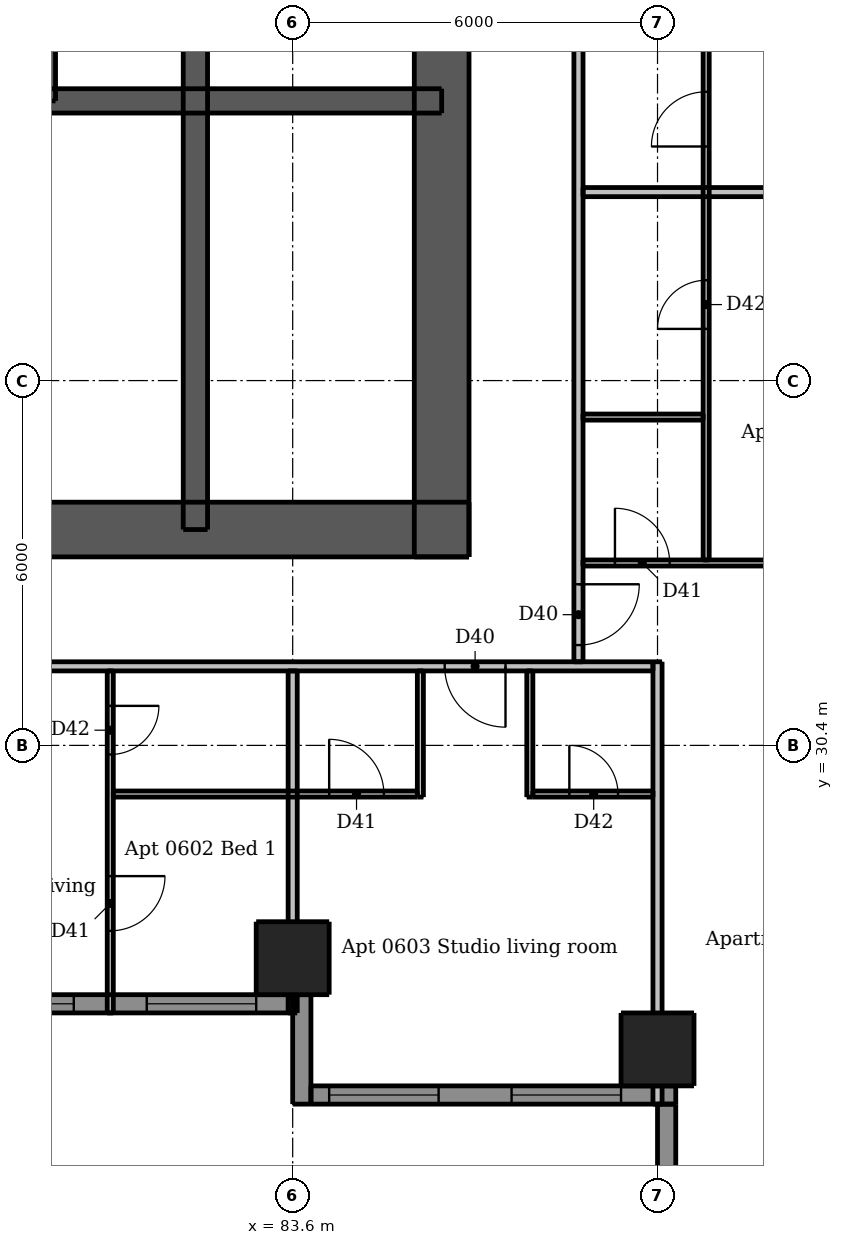
"""IFC4 building model, lengths in metres.
Left out: names, types, materials, properties, quantities, classifications, styles, units other than length and angle.
Written with IfcOpenShell. Run it as: python <this file> out.ifc"""

import sys

from ifc_helpers import new_model, si_unit, direction, frame, frame_2d, origin, origin_2d, place, context, subcontext, project, spatial, rectangle, extrude, element, fill, save


model = new_model("IFC4")
c1 = context("Model", 3, precision=1e-05, world=origin(), true_north=direction((0.0, 1.0)))
c2 = subcontext(c1, "Body", "Model", "MODEL_VIEW")
j1 = project(units=[si_unit("LENGTHUNIT", "METRE"), si_unit("PLANEANGLEUNIT", "RADIAN")], contexts=[c1])
p1 = place(None, origin())
s1 = spatial("IfcSite", under=j1, at=p1, CompositionType="ELEMENT")
p2 = place(p1, origin())
s2 = spatial("IfcBuilding", under=s1, at=p2, CompositionType="ELEMENT")
p3 = place(p2, frame((0.0, 0.0, 26.8)))
s3 = spatial("IfcBuildingStorey", under=s2, at=p3, CompositionType="ELEMENT", Elevation=26.8)
p4 = place(p3, frame((62.5, 33.95, 0.0), z_axis=(0.0, 0.0, 1.0), x_axis=(1.0, 0.0, 0.0)))
e1 = element("IfcWall", 1, at=p4, inside=s3, PredefinedType="SHEAR", context=c2, shape_type="SweptSolid", body=[
    extrude(rectangle(XDim=24.0, YDim=0.9, at=frame_2d((12.0, 0.0))), origin(), (0.0, 0.0, 1.0), 3.05),
])
p5 = place(p4, frame((2.05, 0.0, 0.0)))
e2 = element("IfcOpeningElement", 2, at=p5, cuts=e1, PredefinedType="OPENING", context=c2, shape_type="SweptSolid", body=[
    extrude(rectangle(XDim=1.1, YDim=2.1, at=frame_2d((0.55, 1.05))), frame((0.0, 0.46, 0.0), z_axis=(0.0, -1.0, 0.0), x_axis=(1.0, 0.0, 0.0)), (0.0, 0.0, 1.0), 0.92),
])
p6 = place(p4, frame((20.85, 0.0, 0.0)))
e3 = element("IfcOpeningElement", 3, at=p6, cuts=e1, PredefinedType="OPENING", context=c2, shape_type="SweptSolid", body=[
    extrude(rectangle(XDim=1.1, YDim=2.1, at=frame_2d((0.55, 1.05))), frame((0.0, 0.46, 0.0), z_axis=(0.0, -1.0, 0.0), x_axis=(1.0, 0.0, 0.0)), (0.0, 0.0, 1.0), 0.92),
])
p7 = place(p4, frame((8.0, 0.0, 0.0)))
e4 = element("IfcOpeningElement", 4, at=p7, cuts=e1, PredefinedType="OPENING", context=c2, shape_type="SweptSolid", body=[
    extrude(rectangle(XDim=1.1, YDim=2.1, at=frame_2d((0.55, 1.05))), frame((0.0, 0.46, 0.0), z_axis=(0.0, -1.0, 0.0), x_axis=(1.0, 0.0, 0.0)), (0.0, 0.0, 1.0), 0.92),
])
p8 = place(p4, frame((15.3, 0.0, 0.0)))
e5 = element("IfcOpeningElement", 5, at=p8, cuts=e1, PredefinedType="OPENING", context=c2, shape_type="SweptSolid", body=[
    extrude(rectangle(XDim=0.9, YDim=2.1, at=frame_2d((0.45, 1.05))), frame((0.0, 0.46, 0.0), z_axis=(0.0, -1.0, 0.0), x_axis=(1.0, 0.0, 0.0)), (0.0, 0.0, 1.0), 0.92),
])
p9 = place(p3, frame((86.05, 33.5, 0.0), z_axis=(0.0, 0.0, 1.0), x_axis=(0.0, 1.0, 0.0)))
e6 = element("IfcWall", 6, at=p9, inside=s3, PredefinedType="SHEAR", context=c2, shape_type="SweptSolid", body=[
    extrude(rectangle(XDim=24.0, YDim=0.9, at=frame_2d((12.0, 0.0))), origin(), (0.0, 0.0, 1.0), 3.05),
])
p10 = place(p9, frame((11.2, 0.0, 0.0)))
e7 = element("IfcOpeningElement", 7, at=p10, cuts=e6, PredefinedType="OPENING", context=c2, shape_type="SweptSolid", body=[
    extrude(rectangle(XDim=1.6, YDim=2.1, at=frame_2d((0.8, 1.05))), frame((0.0, 0.46, 0.0), z_axis=(0.0, -1.0, 0.0), x_axis=(1.0, 0.0, 0.0)), (0.0, 0.0, 1.0), 0.92),
])
p11 = place(p3, frame((62.95, 41.0, 0.0), z_axis=(0.0, 0.0, 1.0), x_axis=(1.0, 0.0, 0.0)))
e8 = element("IfcWall", 8, at=p11, inside=s3, PredefinedType="SHEAR", context=c2, shape_type="SweptSolid", body=[
    extrude(rectangle(XDim=23.1, YDim=0.4, at=frame_2d((11.55, 0.0))), origin(), (0.0, 0.0, 1.0), 3.05),
])
p12 = place(p3, frame((82.0, 33.95, 0.0), z_axis=(0.0, 0.0, 1.0), x_axis=(0.0, 1.0, 0.0)))
e9 = element("IfcWall", 9, at=p12, inside=s3, PredefinedType="SHEAR", context=c2, shape_type="SweptSolid", body=[
    extrude(rectangle(XDim=9.95, YDim=0.4, at=frame_2d((4.975, 0.0))), origin(), (0.0, 0.0, 1.0), 3.05),
])
p13 = place(p3, frame((79.5, 41.0, 0.0), z_axis=(0.0, 0.0, 1.0), x_axis=(0.0, 1.0, 0.0)))
e10 = element("IfcWall", 10, at=p13, inside=s3, PredefinedType="SHEAR", context=c2, shape_type="SweptSolid", body=[
    extrude(rectangle(XDim=2.9, YDim=0.4, at=frame_2d((1.45, 0.0))), origin(), (0.0, 0.0, 1.0), 3.05),
])
for number, where, z_axis, x_axis in (
    (11, (83.6, 26.9, 0.0), (0.0, 0.0, 1.0), (1.0, 0.0, 0.0)),
    (12, (89.6, 25.4, 0.0), (0.0, 0.0, 1.0), (1.0, 0.0, 0.0)),
):
    element("IfcColumn", number, at=place(p3, frame(where, z_axis=z_axis, x_axis=x_axis)), inside=s3, PredefinedType="COLUMN", context=c2, shape_type="SweptSolid", body=[
        extrude(rectangle(XDim=1.2, YDim=1.2, at=origin_2d()), origin(), (0.0, 0.0, 1.0), 3.05),
    ])
p14 = place(p3, frame((83.75, 26.3, 0.0), z_axis=(0.0, 0.0, 1.0), x_axis=(0.0, -1.0, 0.0)))
e13 = element("IfcWall", 13, at=p14, inside=s3, PredefinedType="SOLIDWALL", context=c2, shape_type="SweptSolid", body=[
    extrude(rectangle(XDim=1.8, YDim=0.3, at=frame_2d((0.9, 0.0))), origin(), (0.0, 0.0, 1.0), 3.05),
])
p15 = place(p3, frame((89.75, 24.5, 0.0), z_axis=(0.0, 0.0, 1.0), x_axis=(0.0, -1.0, 0.0)))
e14 = element("IfcWall", 14, at=p15, inside=s3, PredefinedType="SOLIDWALL", context=c2, shape_type="SweptSolid", body=[
    extrude(rectangle(XDim=4.5, YDim=0.3, at=frame_2d((2.25, 0.0))), origin(), (0.0, 0.0, 1.0), 3.05),
])
p16 = place(p15, frame((1.05, 0.0, 0.15)))
e15 = element("IfcOpeningElement", 15, at=p16, cuts=e14, PredefinedType="OPENING", context=c2, shape_type="SweptSolid", body=[
    extrude(rectangle(XDim=2.4, YDim=2.1, at=frame_2d((1.2, 1.05))), frame((0.0, 0.16, 0.0), z_axis=(0.0, -1.0, 0.0), x_axis=(1.0, 0.0, 0.0)), (0.0, 0.0, 1.0), 0.32),
])
p17 = place(p3, frame((77.6, 26.15, 0.0), z_axis=(0.0, 0.0, 1.0), x_axis=(1.0, 0.0, 0.0)))
e16 = element("IfcWall", 16, at=p17, inside=s3, PredefinedType="SOLIDWALL", context=c2, shape_type="SweptSolid", body=[
    extrude(rectangle(XDim=6.0, YDim=0.3, at=frame_2d((3.0, 0.0))), origin(), (0.0, 0.0, 1.0), 3.05),
])
p18 = place(p17, frame((0.6, 0.0, 0.15)))
e17 = element("IfcOpeningElement", 17, at=p18, cuts=e16, PredefinedType="OPENING", context=c2, shape_type="SweptSolid", body=[
    extrude(rectangle(XDim=1.8, YDim=2.1, at=frame_2d((0.9, 1.05))), frame((0.0, 0.16, 0.0), z_axis=(0.0, -1.0, 0.0), x_axis=(1.0, 0.0, 0.0)), (0.0, 0.0, 1.0), 0.32),
])
p19 = place(p17, frame((3.6, 0.0, 0.15)))
e18 = element("IfcOpeningElement", 18, at=p19, cuts=e16, PredefinedType="OPENING", context=c2, shape_type="SweptSolid", body=[
    extrude(rectangle(XDim=1.8, YDim=2.1, at=frame_2d((0.9, 1.05))), frame((0.0, 0.16, 0.0), z_axis=(0.0, -1.0, 0.0), x_axis=(1.0, 0.0, 0.0)), (0.0, 0.0, 1.0), 0.32),
])
p20 = place(p3, frame((83.9, 24.65, 0.0), z_axis=(0.0, 0.0, 1.0), x_axis=(1.0, 0.0, 0.0)))
e19 = element("IfcWall", 19, at=p20, inside=s3, PredefinedType="SOLIDWALL", context=c2, shape_type="SweptSolid", body=[
    extrude(rectangle(XDim=6.0, YDim=0.3, at=frame_2d((3.0, 0.0))), origin(), (0.0, 0.0, 1.0), 3.05),
])
p21 = place(p20, frame((0.3, 0.0, 0.15)))
e20 = element("IfcOpeningElement", 20, at=p21, cuts=e19, PredefinedType="OPENING", context=c2, shape_type="SweptSolid", body=[
    extrude(rectangle(XDim=1.8, YDim=2.1, at=frame_2d((0.9, 1.05))), frame((0.0, 0.16, 0.0), z_axis=(0.0, -1.0, 0.0), x_axis=(1.0, 0.0, 0.0)), (0.0, 0.0, 1.0), 0.32),
])
p22 = place(p20, frame((3.3, 0.0, 0.15)))
e21 = element("IfcOpeningElement", 21, at=p22, cuts=e19, PredefinedType="OPENING", context=c2, shape_type="SweptSolid", body=[
    extrude(rectangle(XDim=1.8, YDim=2.1, at=frame_2d((0.9, 1.05))), frame((0.0, 0.16, 0.0), z_axis=(0.0, -1.0, 0.0), x_axis=(1.0, 0.0, 0.0)), (0.0, 0.0, 1.0), 0.32),
])
p23 = place(p3, frame((80.6, 31.625, 0.0), z_axis=(0.0, 0.0, 1.0), x_axis=(0.0, -1.0, 0.0)))
e22 = element("IfcWall", 22, at=p23, inside=s3, PredefinedType="PARTITIONING", context=c2, shape_type="SweptSolid", body=[
    extrude(rectangle(XDim=5.625, YDim=0.1, at=frame_2d((2.812, 0.0))), origin(), (0.0, 0.0, 1.0), 3.05),
])
p24 = place(p23, frame((3.375, 0.0, 0.0)))
e23 = element("IfcOpeningElement", 23, at=p24, cuts=e22, PredefinedType="OPENING", context=c2, shape_type="SweptSolid", body=[
    extrude(rectangle(XDim=0.9, YDim=2.1, at=frame_2d((0.45, 1.05))), frame((0.0, 0.06, 0.0), z_axis=(0.0, -1.0, 0.0), x_axis=(1.0, 0.0, 0.0)), (0.0, 0.0, 1.0), 0.12),
])
p25 = place(p23, frame((0.575, 0.0, 0.0)))
e24 = element("IfcOpeningElement", 24, at=p25, cuts=e22, PredefinedType="OPENING", context=c2, shape_type="SweptSolid", body=[
    extrude(rectangle(XDim=0.8, YDim=2.1, at=frame_2d((0.4, 1.05))), frame((0.0, 0.06, 0.0), z_axis=(0.0, -1.0, 0.0), x_axis=(1.0, 0.0, 0.0)), (0.0, 0.0, 1.0), 0.12),
])
for number, where, z_axis, x_axis in (
    (25, (85.7, 29.55, 0.0), (0.0, 0.0, 1.0), (0.0, 1.0, 0.0)),
    (26, (87.5, 29.55, 0.0), (0.0, 0.0, 1.0), (0.0, 1.0, 0.0)),
):
    element("IfcWall", number, at=place(p3, frame(where, z_axis=z_axis, x_axis=x_axis)), inside=s3, PredefinedType="PARTITIONING", context=c2, shape_type="SweptSolid", body=[
        extrude(rectangle(XDim=2.075, YDim=0.1, at=frame_2d((1.038, 0.0))), origin(), (0.0, 0.0, 1.0), 3.05),
    ])
p26 = place(p3, frame((90.4, 33.45, 0.0), z_axis=(0.0, 0.0, 1.0), x_axis=(0.0, 1.0, 0.0)))
e27 = element("IfcWall", 27, at=p26, inside=s3, PredefinedType="PARTITIONING", context=c2, shape_type="SweptSolid", body=[
    extrude(rectangle(XDim=8.5, YDim=0.1, at=frame_2d((4.25, 0.0))), origin(), (0.0, 0.0, 1.0), 3.05),
])
p27 = place(p26, frame((3.8, 0.0, 0.0)))
e28 = element("IfcOpeningElement", 28, at=p27, cuts=e27, PredefinedType="OPENING", context=c2, shape_type="SweptSolid", body=[
    extrude(rectangle(XDim=0.8, YDim=2.1, at=frame_2d((0.4, 1.05))), frame((0.0, 0.06, 0.0), z_axis=(0.0, -1.0, 0.0), x_axis=(1.0, 0.0, 0.0)), (0.0, 0.0, 1.0), 0.12),
])
p28 = place(p26, frame((6.8, 0.0, 0.0)))
e29 = element("IfcOpeningElement", 29, at=p28, cuts=e27, PredefinedType="OPENING", context=c2, shape_type="SweptSolid", body=[
    extrude(rectangle(XDim=0.9, YDim=2.1, at=frame_2d((0.45, 1.05))), frame((0.0, 0.06, 0.0), z_axis=(0.0, -1.0, 0.0), x_axis=(1.0, 0.0, 0.0)), (0.0, 0.0, 1.0), 0.12),
])
p29 = place(p3, frame((88.375, 35.8, 0.0), z_axis=(0.0, 0.0, 1.0), x_axis=(1.0, 0.0, 0.0)))
e30 = element("IfcWall", 30, at=p29, inside=s3, PredefinedType="PARTITIONING", context=c2, shape_type="SweptSolid", body=[
    extrude(rectangle(XDim=1.975, YDim=0.1, at=frame_2d((0.988, 0.0))), origin(), (0.0, 0.0, 1.0), 3.05),
])
p30 = place(p3, frame((88.375, 33.4, 0.0), z_axis=(0.0, 0.0, 1.0), x_axis=(1.0, 0.0, 0.0)))
e31 = element("IfcWall", 31, at=p30, inside=s3, PredefinedType="PARTITIONING", context=c2, shape_type="SweptSolid", body=[
    extrude(rectangle(XDim=5.625, YDim=0.1, at=frame_2d((2.812, 0.0))), origin(), (0.0, 0.0, 1.0), 3.05),
])
p31 = place(p30, frame((0.525, 0.0, 0.0)))
e32 = element("IfcOpeningElement", 32, at=p31, cuts=e31, PredefinedType="OPENING", context=c2, shape_type="SweptSolid", body=[
    extrude(rectangle(XDim=0.9, YDim=2.1, at=frame_2d((0.45, 1.05))), frame((0.0, 0.06, 0.0), z_axis=(0.0, -1.0, 0.0), x_axis=(1.0, 0.0, 0.0)), (0.0, 0.0, 1.0), 0.12),
])
p32 = place(p30, frame((3.375, 0.0, 0.0)))
e33 = element("IfcOpeningElement", 33, at=p32, cuts=e31, PredefinedType="OPENING", context=c2, shape_type="SweptSolid", body=[
    extrude(rectangle(XDim=0.9, YDim=2.1, at=frame_2d((0.45, 1.05))), frame((0.0, 0.06, 0.0), z_axis=(0.0, -1.0, 0.0), x_axis=(1.0, 0.0, 0.0)), (0.0, 0.0, 1.0), 0.12),
])
p33 = place(p3, frame((80.65, 29.6, 0.0), z_axis=(0.0, 0.0, 1.0), x_axis=(1.0, 0.0, 0.0)))
e34 = element("IfcWall", 34, at=p33, inside=s3, PredefinedType="PARTITIONING", context=c2, shape_type="SweptSolid", body=[
    extrude(rectangle(XDim=5.0, YDim=0.1, at=frame_2d((2.5, 0.0))), origin(), (0.0, 0.0, 1.0), 3.05),
])
p34 = place(p33, frame((3.55, 0.0, 0.0)))
e35 = element("IfcOpeningElement", 35, at=p34, cuts=e34, PredefinedType="OPENING", context=c2, shape_type="SweptSolid", body=[
    extrude(rectangle(XDim=0.9, YDim=2.1, at=frame_2d((0.45, 1.05))), frame((0.0, 0.06, 0.0), z_axis=(0.0, -1.0, 0.0), x_axis=(1.0, 0.0, 0.0)), (0.0, 0.0, 1.0), 0.12),
])
p35 = place(p3, frame((87.55, 29.6, 0.0), z_axis=(0.0, 0.0, 1.0), x_axis=(1.0, 0.0, 0.0)))
e36 = element("IfcWall", 36, at=p35, inside=s3, PredefinedType="PARTITIONING", context=c2, shape_type="SweptSolid", body=[
    extrude(rectangle(XDim=1.975, YDim=0.1, at=frame_2d((0.987, 0.0))), origin(), (0.0, 0.0, 1.0), 3.05),
])
p36 = place(p35, frame((0.6, 0.0, 0.0)))
e37 = element("IfcOpeningElement", 37, at=p36, cuts=e36, PredefinedType="OPENING", context=c2, shape_type="SweptSolid", body=[
    extrude(rectangle(XDim=0.8, YDim=2.1, at=frame_2d((0.4, 1.05))), frame((0.0, 0.06, 0.0), z_axis=(0.0, -1.0, 0.0), x_axis=(1.0, 0.0, 0.0)), (0.0, 0.0, 1.0), 0.12),
])
p37 = place(p3, frame((83.6, 26.0, 0.0), z_axis=(0.0, 0.0, 1.0), x_axis=(0.0, 1.0, 0.0)))
e38 = element("IfcWall", 38, at=p37, inside=s3, PredefinedType="PARTITIONING", context=c2, shape_type="SweptSolid", body=[
    extrude(rectangle(XDim=5.625, YDim=0.15, at=frame_2d((2.812, 0.0))), origin(), (0.0, 0.0, 1.0), 2.647),
])
p38 = place(p3, frame((88.3, 60.475, 0.0), z_axis=(0.0, 0.0, 1.0), x_axis=(0.0, -1.0, 0.0)))
e39 = element("IfcWall", 39, at=p38, inside=s3, PredefinedType="PARTITIONING", context=c2, shape_type="SweptSolid", body=[
    extrude(rectangle(XDim=28.7, YDim=0.15, at=frame_2d((14.35, 0.0))), origin(), (0.0, 0.0, 1.0), 3.05),
])
p39 = place(p38, frame((27.425, 0.0, 0.0)))
e40 = element("IfcOpeningElement", 40, at=p39, cuts=e39, PredefinedType="OPENING", context=c2, shape_type="SweptSolid", body=[
    extrude(rectangle(XDim=1.0, YDim=2.1, at=frame_2d((0.5, 1.05))), frame((0.0, 0.085, 0.0), z_axis=(0.0, -1.0, 0.0), x_axis=(1.0, 0.0, 0.0)), (0.0, 0.0, 1.0), 0.17),
])
p40 = place(p38, frame((16.325, 0.0, 0.0)))
e41 = element("IfcOpeningElement", 41, at=p40, cuts=e39, PredefinedType="OPENING", context=c2, shape_type="SweptSolid", body=[
    extrude(rectangle(XDim=1.0, YDim=2.1, at=frame_2d((0.5, 1.05))), frame((0.0, 0.085, 0.0), z_axis=(0.0, -1.0, 0.0), x_axis=(1.0, 0.0, 0.0)), (0.0, 0.0, 1.0), 0.17),
])
p41 = place(p38, frame((5.525, 0.0, 0.0)))
e42 = element("IfcOpeningElement", 42, at=p41, cuts=e39, PredefinedType="OPENING", context=c2, shape_type="SweptSolid", body=[
    extrude(rectangle(XDim=1.0, YDim=2.1, at=frame_2d((0.5, 1.05))), frame((0.0, 0.085, 0.0), z_axis=(0.0, -1.0, 0.0), x_axis=(1.0, 0.0, 0.0)), (0.0, 0.0, 1.0), 0.17),
])
p42 = place(p3, frame((89.6, 24.5, 0.0), z_axis=(0.0, 0.0, 1.0), x_axis=(0.0, 1.0, 0.0)))
e43 = element("IfcWall", 43, at=p42, inside=s3, PredefinedType="PARTITIONING", context=c2, shape_type="SweptSolid", body=[
    extrude(rectangle(XDim=7.275, YDim=0.15, at=frame_2d((3.637, 0.0))), origin(), (0.0, 0.0, 1.0), 2.516),
])
p43 = place(p3, frame((88.375, 39.5, 0.0), z_axis=(0.0, 0.0, 1.0), x_axis=(1.0, 0.0, 0.0)))
e44 = element("IfcWall", 44, at=p43, inside=s3, PredefinedType="PARTITIONING", context=c2, shape_type="SweptSolid", body=[
    extrude(rectangle(XDim=5.625, YDim=0.15, at=frame_2d((2.812, 0.0))), origin(), (0.0, 0.0, 1.0), 3.05),
])
p44 = place(p3, frame((89.525, 31.7, 0.0), z_axis=(0.0, 0.0, 1.0), x_axis=(-1.0, 0.0, 0.0)))
e45 = element("IfcWall", 45, at=p44, inside=s3, PredefinedType="PARTITIONING", context=c2, shape_type="SweptSolid", body=[
    extrude(rectangle(XDim=28.75, YDim=0.15, at=frame_2d((14.375, 0.0))), origin(), (0.0, 0.0, 1.0), 3.05),
])
p45 = place(p44, frame((24.625, 0.0, 0.0)))
e46 = element("IfcOpeningElement", 46, at=p45, cuts=e45, PredefinedType="OPENING", context=c2, shape_type="SweptSolid", body=[
    extrude(rectangle(XDim=1.0, YDim=2.1, at=frame_2d((0.5, 1.05))), frame((0.0, 0.085, 0.0), z_axis=(0.0, -1.0, 0.0), x_axis=(1.0, 0.0, 0.0)), (0.0, 0.0, 1.0), 0.17),
])
p46 = place(p44, frame((10.225, 0.0, 0.0)))
e47 = element("IfcOpeningElement", 47, at=p46, cuts=e45, PredefinedType="OPENING", context=c2, shape_type="SweptSolid", body=[
    extrude(rectangle(XDim=1.0, YDim=2.1, at=frame_2d((0.5, 1.05))), frame((0.0, 0.085, 0.0), z_axis=(0.0, -1.0, 0.0), x_axis=(1.0, 0.0, 0.0)), (0.0, 0.0, 1.0), 0.17),
])
p47 = place(p44, frame((2.425, 0.0, 0.0)))
e48 = element("IfcOpeningElement", 48, at=p47, cuts=e45, PredefinedType="OPENING", context=c2, shape_type="SweptSolid", body=[
    extrude(rectangle(XDim=1.0, YDim=2.1, at=frame_2d((0.5, 1.05))), frame((0.0, 0.085, 0.0), z_axis=(0.0, -1.0, 0.0), x_axis=(1.0, 0.0, 0.0)), (0.0, 0.0, 1.0), 0.17),
])
p48 = place(p18, origin())
e49 = element("IfcWindow", 49, at=p48, inside=s3, PartitioningType="DOUBLE_PANEL_VERTICAL", PredefinedType="WINDOW", context=c2, shape_type="SweptSolid", body=[
    extrude(rectangle(XDim=1.8, YDim=2.1, at=frame_2d((0.9, 1.05))), frame((0.0, 0.03, 0.0), z_axis=(0.0, -1.0, 0.0), x_axis=(1.0, 0.0, 0.0)), (0.0, 0.0, 1.0), 0.06),
])
fill(e17, e49)
p49 = place(p19, origin())
e50 = element("IfcWindow", 50, at=p49, inside=s3, PartitioningType="DOUBLE_PANEL_VERTICAL", PredefinedType="WINDOW", context=c2, shape_type="SweptSolid", body=[
    extrude(rectangle(XDim=1.8, YDim=2.1, at=frame_2d((0.9, 1.05))), frame((0.0, 0.03, 0.0), z_axis=(0.0, -1.0, 0.0), x_axis=(1.0, 0.0, 0.0)), (0.0, 0.0, 1.0), 0.06),
])
fill(e18, e50)
p50 = place(p21, origin())
e51 = element("IfcWindow", 51, at=p50, inside=s3, PartitioningType="DOUBLE_PANEL_VERTICAL", PredefinedType="WINDOW", context=c2, shape_type="SweptSolid", body=[
    extrude(rectangle(XDim=1.8, YDim=2.1, at=frame_2d((0.9, 1.05))), frame((0.0, 0.03, 0.0), z_axis=(0.0, -1.0, 0.0), x_axis=(1.0, 0.0, 0.0)), (0.0, 0.0, 1.0), 0.06),
])
fill(e20, e51)
p51 = place(p22, origin())
e52 = element("IfcWindow", 52, at=p51, inside=s3, PartitioningType="DOUBLE_PANEL_VERTICAL", PredefinedType="WINDOW", context=c2, shape_type="SweptSolid", body=[
    extrude(rectangle(XDim=1.8, YDim=2.1, at=frame_2d((0.9, 1.05))), frame((0.0, 0.03, 0.0), z_axis=(0.0, -1.0, 0.0), x_axis=(1.0, 0.0, 0.0)), (0.0, 0.0, 1.0), 0.06),
])
fill(e21, e52)
p52 = place(p6, origin())
e53 = element("IfcDoor", 53, at=p52, inside=s3, OperationType="SINGLE_SWING_RIGHT", PredefinedType="DOOR", context=c2, shape_type="SweptSolid", body=[
    extrude(rectangle(XDim=1.1, YDim=2.1, at=frame_2d((0.55, 1.05))), frame((0.0, 0.438, 0.0), z_axis=(0.0, -1.0, 0.0), x_axis=(1.0, 0.0, 0.0)), (0.0, 0.0, 1.0), 0.05),
])
fill(e3, e53)
p53 = place(p24, origin())
e54 = element("IfcDoor", 54, at=p53, inside=s3, OperationType="SINGLE_SWING_LEFT", PredefinedType="DOOR", context=c2, shape_type="SweptSolid", body=[
    extrude(rectangle(XDim=0.9, YDim=2.1, at=frame_2d((0.45, 1.05))), frame((0.0, 0.025, 0.0), z_axis=(0.0, -1.0, 0.0), x_axis=(1.0, 0.0, 0.0)), (0.0, 0.0, 1.0), 0.05),
])
fill(e23, e54)
p54 = place(p25, origin())
e55 = element("IfcDoor", 55, at=p54, inside=s3, OperationType="SINGLE_SWING_LEFT", PredefinedType="DOOR", context=c2, shape_type="SweptSolid", body=[
    extrude(rectangle(XDim=0.8, YDim=2.1, at=frame_2d((0.4, 1.05))), frame((0.0, 0.025, 0.0), z_axis=(0.0, -1.0, 0.0), x_axis=(1.0, 0.0, 0.0)), (0.0, 0.0, 1.0), 0.05),
])
fill(e24, e55)
p55 = place(p47, origin())
e56 = element("IfcDoor", 56, at=p55, inside=s3, OperationType="SINGLE_SWING_LEFT", PredefinedType="DOOR", context=c2, shape_type="SweptSolid", body=[
    extrude(rectangle(XDim=1.0, YDim=2.1, at=frame_2d((0.5, 1.05))), frame((0.0, 0.025, 0.0), z_axis=(0.0, -1.0, 0.0), x_axis=(1.0, 0.0, 0.0)), (0.0, 0.0, 1.0), 0.05),
])
fill(e48, e56)
p56 = place(p34, origin())
e57 = element("IfcDoor", 57, at=p56, inside=s3, OperationType="SINGLE_SWING_LEFT", PredefinedType="DOOR", context=c2, shape_type="SweptSolid", body=[
    extrude(rectangle(XDim=0.9, YDim=2.1, at=frame_2d((0.45, 1.05))), frame((0.0, 0.025, 0.0), z_axis=(0.0, -1.0, 0.0), x_axis=(1.0, 0.0, 0.0)), (0.0, 0.0, 1.0), 0.05),
])
fill(e35, e57)
p57 = place(p36, origin())
e58 = element("IfcDoor", 58, at=p57, inside=s3, OperationType="SINGLE_SWING_LEFT", PredefinedType="DOOR", context=c2, shape_type="SweptSolid", body=[
    extrude(rectangle(XDim=0.8, YDim=2.1, at=frame_2d((0.4, 1.05))), frame((0.0, 0.025, 0.0), z_axis=(0.0, -1.0, 0.0), x_axis=(1.0, 0.0, 0.0)), (0.0, 0.0, 1.0), 0.05),
])
fill(e37, e58)
p58 = place(p39, origin())
e59 = element("IfcDoor", 59, at=p58, inside=s3, OperationType="SINGLE_SWING_LEFT", PredefinedType="DOOR", context=c2, shape_type="SweptSolid", body=[
    extrude(rectangle(XDim=1.0, YDim=2.1, at=frame_2d((0.5, 1.05))), frame((0.0, 0.025, 0.0), z_axis=(0.0, -1.0, 0.0), x_axis=(1.0, 0.0, 0.0)), (0.0, 0.0, 1.0), 0.05),
])
fill(e40, e59)
p59 = place(p31, origin())
e60 = element("IfcDoor", 60, at=p59, inside=s3, OperationType="SINGLE_SWING_LEFT", PredefinedType="DOOR", context=c2, shape_type="SweptSolid", body=[
    extrude(rectangle(XDim=0.9, YDim=2.1, at=frame_2d((0.45, 1.05))), frame((0.0, 0.025, 0.0), z_axis=(0.0, -1.0, 0.0), x_axis=(1.0, 0.0, 0.0)), (0.0, 0.0, 1.0), 0.05),
])
fill(e32, e60)
p60 = place(p27, origin())
e61 = element("IfcDoor", 61, at=p60, inside=s3, OperationType="SINGLE_SWING_LEFT", PredefinedType="DOOR", context=c2, shape_type="SweptSolid", body=[
    extrude(rectangle(XDim=0.8, YDim=2.1, at=frame_2d((0.4, 1.05))), frame((0.0, 0.025, 0.0), z_axis=(0.0, -1.0, 0.0), x_axis=(1.0, 0.0, 0.0)), (0.0, 0.0, 1.0), 0.05),
])
fill(e28, e61)
p61 = place(p28, origin())
e62 = element("IfcDoor", 62, at=p61, inside=s3, OperationType="SINGLE_SWING_LEFT", PredefinedType="DOOR", context=c2, shape_type="SweptSolid", body=[
    extrude(rectangle(XDim=0.9, YDim=2.1, at=frame_2d((0.45, 1.05))), frame((0.0, 0.025, 0.0), z_axis=(0.0, -1.0, 0.0), x_axis=(1.0, 0.0, 0.0)), (0.0, 0.0, 1.0), 0.05),
])
fill(e29, e62)
save(model, sys.argv[1])
